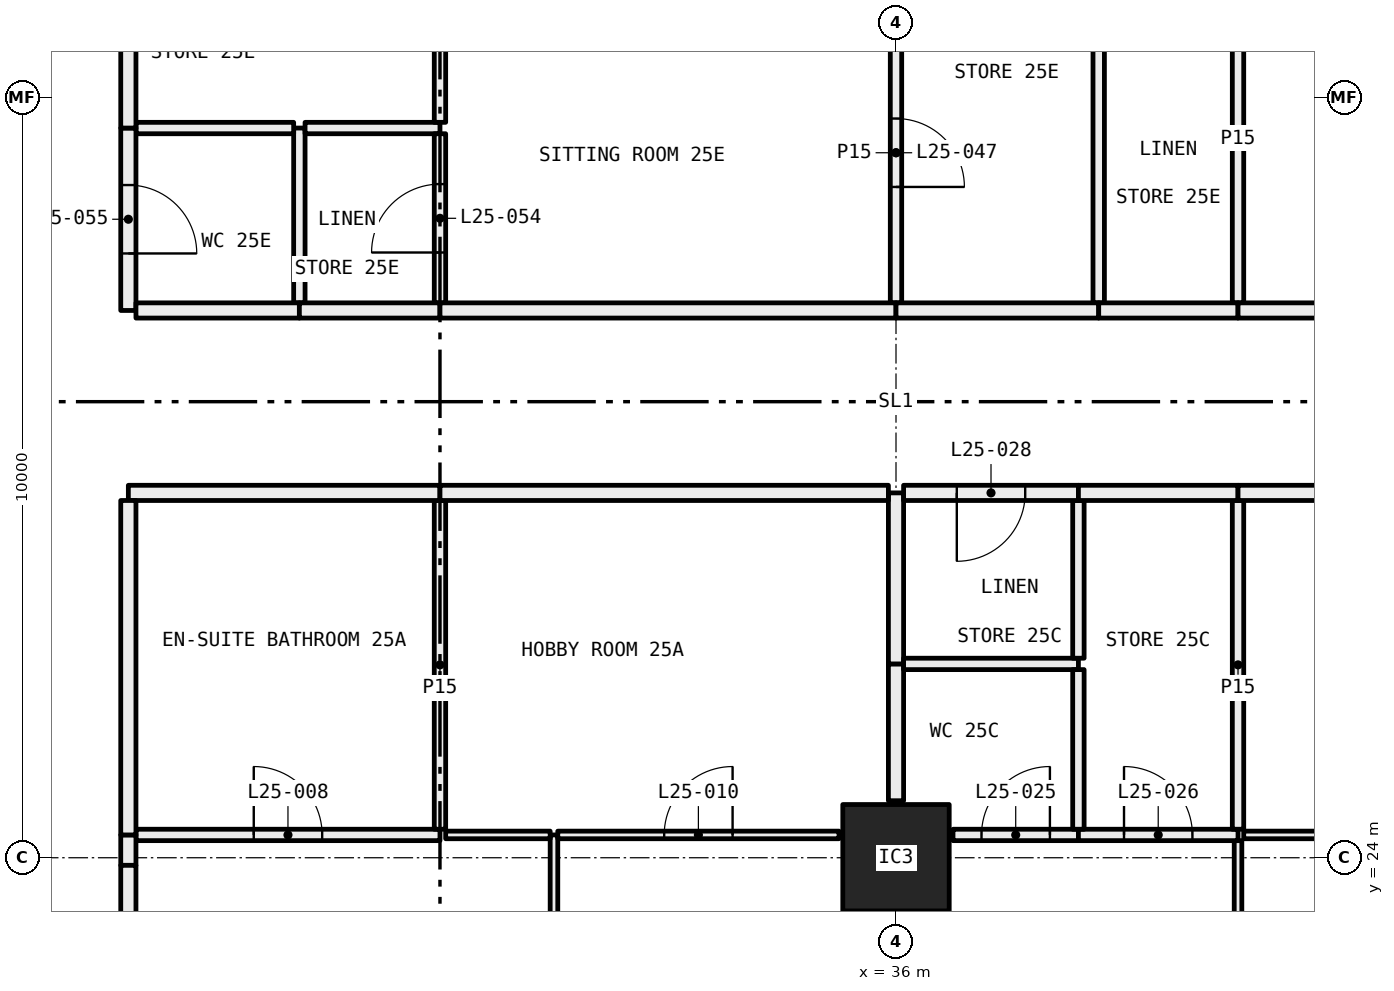
"""IFC4 building model, lengths in metres.
Left out: names, types, materials, properties, quantities, classifications, styles, units other than length and angle.
Written with IfcOpenShell. Run it as: python <this file> out.ifc"""

import sys

from ifc_helpers import new_model, si_unit, direction, frame, frame_2d, origin, origin_2d, place, context, subcontext, project, spatial, rectangle, hollow_rectangle, extrude, element, fill, save


model = new_model("IFC4")
c1 = context("Model", 3, precision=1e-05, world=origin(), true_north=direction((0.0, 1.0)))
c2 = subcontext(c1, "Body", "Model", "MODEL_VIEW")
j1 = project(units=[si_unit("LENGTHUNIT", "METRE"), si_unit("PLANEANGLEUNIT", "RADIAN")], contexts=[c1])
p1 = place(None, origin())
s1 = spatial("IfcSite", under=j1, at=p1, CompositionType="ELEMENT")
p2 = place(p1, origin())
s2 = spatial("IfcBuilding", under=s1, at=p2, CompositionType="ELEMENT")
p3 = place(p2, frame((0.0, 0.0, 100.05)))
s3 = spatial("IfcBuildingStorey", under=s2, at=p3, CompositionType="ELEMENT", Elevation=100.05)
p4 = place(p3, frame((36.0, 24.0, 0.0), z_axis=(0.0, 0.0, 1.0), x_axis=(1.0, 0.0, 0.0)))
e1 = element("IfcColumn", 1, at=p4, inside=s3, PredefinedType="COLUMN", context=c2, shape_type="SweptSolid", body=[
    extrude(hollow_rectangle(XDim=1.4, YDim=1.4, WallThickness=0.06, at=origin_2d()), origin(), (0.0, 0.0, 1.0), 3.05),
])
p5 = place(p3, frame((31.5, 18.075, 0.0), z_axis=(0.0, 0.0, 1.0), x_axis=(0.0, 1.0, 0.0)))
e2 = element("IfcWall", 2, at=p5, inside=s3, PredefinedType="PARTITIONING", context=c2, shape_type="SweptSolid", body=[
    extrude(rectangle(XDim=6.225, YDim=0.1, at=frame_2d((3.113, 0.0))), origin(), (0.0, 0.0, 1.0), 2.45),
])
p6 = place(p5, frame((2.663, 0.0, 0.0)))
e3 = element("IfcOpeningElement", 3, at=p6, cuts=e2, PredefinedType="OPENING", context=c2, shape_type="SweptSolid", body=[
    extrude(rectangle(XDim=0.9, YDim=2.1, at=frame_2d((0.45, 1.05))), frame((0.0, 0.06, 0.0), z_axis=(0.0, -1.0, 0.0), x_axis=(1.0, 0.0, 0.0)), (0.0, 0.0, 1.0), 0.12),
])
p7 = place(p3, frame((30.0, 24.3, 0.0), z_axis=(0.0, 0.0, 1.0), x_axis=(-1.0, 0.0, 0.0)))
e4 = element("IfcWall", 4, at=p7, inside=s3, PredefinedType="PARTITIONING", context=c2, shape_type="SweptSolid", body=[
    extrude(rectangle(XDim=4.0, YDim=0.15, at=frame_2d((2.0, 0.0))), origin(), (0.0, 0.0, 1.0), 3.05),
])
p8 = place(p7, frame((1.55, 0.0, 0.0)))
e5 = element("IfcOpeningElement", 5, at=p8, cuts=e4, PredefinedType="OPENING", context=c2, shape_type="SweptSolid", body=[
    extrude(rectangle(XDim=0.9, YDim=2.1, at=frame_2d((0.45, 1.05))), frame((0.0, 0.085, 0.0), z_axis=(0.0, -1.0, 0.0), x_axis=(1.0, 0.0, 0.0)), (0.0, 0.0, 1.0), 0.17),
])
p9 = place(p3, frame((31.45, 24.3, 0.0), z_axis=(0.0, 0.0, 1.0), x_axis=(-1.0, 0.0, 0.0)))
e6 = element("IfcWall", 6, at=p9, inside=s3, PredefinedType="PARTITIONING", context=c2, shape_type="SweptSolid", body=[
    extrude(rectangle(XDim=1.375, YDim=0.1, at=frame_2d((0.688, 0.0))), origin(), (0.0, 0.0, 1.0), 3.05),
])
p10 = place(p3, frame((25.9, 24.3, 0.0), z_axis=(0.0, 0.0, 1.0), x_axis=(0.0, -1.0, 0.0)))
e7 = element("IfcWall", 7, at=p10, inside=s3, PredefinedType="PARTITIONING", context=c2, shape_type="SweptSolid", body=[
    extrude(rectangle(XDim=0.4, YDim=0.2, at=frame_2d((0.2, 0.0))), origin(), (0.0, 0.0, 1.0), 2.45),
])
p11 = place(p3, frame((25.9, 23.9, 0.0), z_axis=(0.0, 0.0, 1.0), x_axis=(0.0, -1.0, 0.0)))
e8 = element("IfcWall", 8, at=p11, inside=s3, PredefinedType="PARTITIONING", context=c2, shape_type="SweptSolid", body=[
    extrude(rectangle(XDim=5.8, YDim=0.2, at=frame_2d((2.9, 0.0))), origin(), (0.0, 0.0, 1.0), 3.05),
])
p12 = place(p3, frame((35.25, 24.3, 0.0), z_axis=(0.0, 0.0, 1.0), x_axis=(-1.0, 0.0, 0.0)))
e9 = element("IfcWall", 9, at=p12, inside=s3, PredefinedType="PARTITIONING", context=c2, shape_type="SweptSolid", body=[
    extrude(rectangle(XDim=3.7, YDim=0.1, at=frame_2d((1.85, 0.0))), origin(), (0.0, 0.0, 1.0), 3.05),
])
p13 = place(p12, frame((1.4, 0.0, 0.0)))
e10 = element("IfcOpeningElement", 10, at=p13, cuts=e9, PredefinedType="OPENING", context=c2, shape_type="SweptSolid", body=[
    extrude(rectangle(XDim=0.9, YDim=2.1, at=frame_2d((0.45, 1.05))), frame((0.0, 0.06, 0.0), z_axis=(0.0, -1.0, 0.0), x_axis=(1.0, 0.0, 0.0)), (0.0, 0.0, 1.0), 0.12),
])
p14 = place(p3, frame((30.0, 24.375, 0.0), z_axis=(0.0, 0.0, 1.0), x_axis=(0.0, 1.0, 0.0)))
e11 = element("IfcWall", 11, at=p14, inside=s3, PredefinedType="PARTITIONING", context=c2, shape_type="SweptSolid", body=[
    extrude(rectangle(XDim=4.325, YDim=0.15, at=frame_2d((2.163, 0.0))), origin(), (0.0, 0.0, 1.0), 3.05),
])
p15 = place(p3, frame((30.0, 28.8, 0.0), z_axis=(0.0, 0.0, 1.0), x_axis=(-1.0, 0.0, 0.0)))
e12 = element("IfcWall", 12, at=p15, inside=s3, PredefinedType="PARTITIONING", context=c2, shape_type="SweptSolid", body=[
    extrude(rectangle(XDim=4.1, YDim=0.2, at=frame_2d((2.05, 0.0))), origin(), (0.0, 0.0, 1.0), 3.05),
])
p16 = place(p3, frame((25.9, 28.7, 0.0), z_axis=(0.0, 0.0, 1.0), x_axis=(0.0, -1.0, 0.0)))
e13 = element("IfcWall", 13, at=p16, inside=s3, PredefinedType="PARTITIONING", context=c2, shape_type="SweptSolid", body=[
    extrude(rectangle(XDim=4.4, YDim=0.2, at=frame_2d((2.2, 0.0))), origin(), (0.0, 0.0, 1.0), 3.05),
])
p17 = place(p3, frame((36.0, 24.75, 0.0), z_axis=(0.0, 0.0, 1.0), x_axis=(0.0, 1.0, 0.0)))
e14 = element("IfcWall", 14, at=p17, inside=s3, PredefinedType="PARTITIONING", context=c2, shape_type="SweptSolid", body=[
    extrude(rectangle(XDim=1.8, YDim=0.2, at=frame_2d((0.9, 0.0))), origin(), (0.0, 0.0, 1.0), 2.45),
])
p18 = place(p3, frame((36.0, 26.55, 0.0), z_axis=(0.0, 0.0, 1.0), x_axis=(0.0, 1.0, 0.0)))
e15 = element("IfcWall", 15, at=p18, inside=s3, PredefinedType="PARTITIONING", context=c2, shape_type="SweptSolid", body=[
    extrude(rectangle(XDim=2.25, YDim=0.2, at=frame_2d((1.125, 0.0))), origin(), (0.0, 0.0, 1.0), 2.45),
])
p19 = place(p3, frame((35.9, 28.8, 0.0), z_axis=(0.0, 0.0, 1.0), x_axis=(-1.0, 0.0, 0.0)))
e16 = element("IfcWall", 16, at=p19, inside=s3, PredefinedType="PARTITIONING", context=c2, shape_type="SweptSolid", body=[
    extrude(rectangle(XDim=5.9, YDim=0.2, at=frame_2d((2.95, 0.0))), origin(), (0.0, 0.0, 1.0), 3.05),
])
p20 = place(p3, frame((40.5, 18.075, 0.0), z_axis=(0.0, 0.0, 1.0), x_axis=(0.0, 1.0, 0.0)))
e17 = element("IfcWall", 17, at=p20, inside=s3, PredefinedType="PARTITIONING", context=c2, shape_type="SweptSolid", body=[
    extrude(rectangle(XDim=6.15, YDim=0.1, at=frame_2d((3.075, 0.0))), origin(), (0.0, 0.0, 1.0), 2.45),
])
p21 = place(p20, frame((2.625, 0.0, 0.0)))
e18 = element("IfcOpeningElement", 18, at=p21, cuts=e17, PredefinedType="OPENING", context=c2, shape_type="SweptSolid", body=[
    extrude(rectangle(XDim=0.9, YDim=2.1, at=frame_2d((0.45, 1.05))), frame((0.0, 0.06, 0.0), z_axis=(0.0, -1.0, 0.0), x_axis=(1.0, 0.0, 0.0)), (0.0, 0.0, 1.0), 0.12),
])
p22 = place(p3, frame((38.4, 24.3, 0.0), z_axis=(0.0, 0.0, 1.0), x_axis=(-1.0, 0.0, 0.0)))
e19 = element("IfcWall", 19, at=p22, inside=s3, PredefinedType="PARTITIONING", context=c2, shape_type="SweptSolid", body=[
    extrude(rectangle(XDim=1.65, YDim=0.15, at=frame_2d((0.825, 0.0))), origin(), (0.0, 0.0, 1.0), 3.05),
])
p23 = place(p22, frame((0.375, 0.0, 0.0)))
e20 = element("IfcOpeningElement", 20, at=p23, cuts=e19, PredefinedType="OPENING", context=c2, shape_type="SweptSolid", body=[
    extrude(rectangle(XDim=0.9, YDim=2.1, at=frame_2d((0.45, 1.05))), frame((0.0, 0.085, 0.0), z_axis=(0.0, -1.0, 0.0), x_axis=(1.0, 0.0, 0.0)), (0.0, 0.0, 1.0), 0.17),
])
p24 = place(p3, frame((40.5, 24.3, 0.0), z_axis=(0.0, 0.0, 1.0), x_axis=(-1.0, 0.0, 0.0)))
e21 = element("IfcWall", 21, at=p24, inside=s3, PredefinedType="PARTITIONING", context=c2, shape_type="SweptSolid", body=[
    extrude(rectangle(XDim=2.1, YDim=0.15, at=frame_2d((1.05, 0.0))), origin(), (0.0, 0.0, 1.0), 3.05),
])
p25 = place(p24, frame((0.6, 0.0, 0.0)))
e22 = element("IfcOpeningElement", 22, at=p25, cuts=e21, PredefinedType="OPENING", context=c2, shape_type="SweptSolid", body=[
    extrude(rectangle(XDim=0.9, YDim=2.1, at=frame_2d((0.45, 1.05))), frame((0.0, 0.085, 0.0), z_axis=(0.0, -1.0, 0.0), x_axis=(1.0, 0.0, 0.0)), (0.0, 0.0, 1.0), 0.17),
])
p26 = place(p3, frame((46.0, 24.3, 0.0), z_axis=(0.0, 0.0, 1.0), x_axis=(-1.0, 0.0, 0.0)))
e23 = element("IfcWall", 23, at=p26, inside=s3, PredefinedType="PARTITIONING", context=c2, shape_type="SweptSolid", body=[
    extrude(rectangle(XDim=5.425, YDim=0.1, at=frame_2d((2.712, 0.0))), origin(), (0.0, 0.0, 1.0), 3.05),
])
p27 = place(p26, frame((2.262, 0.0, 0.0)))
e24 = element("IfcOpeningElement", 24, at=p27, cuts=e23, PredefinedType="OPENING", context=c2, shape_type="SweptSolid", body=[
    extrude(rectangle(XDim=0.9, YDim=2.1, at=frame_2d((0.45, 1.05))), frame((0.0, 0.06, 0.0), z_axis=(0.0, -1.0, 0.0), x_axis=(1.0, 0.0, 0.0)), (0.0, 0.0, 1.0), 0.12),
])
p28 = place(p3, frame((38.4, 26.55, 0.0), z_axis=(0.0, 0.0, 1.0), x_axis=(-1.0, 0.0, 0.0)))
e25 = element("IfcWall", 25, at=p28, inside=s3, PredefinedType="PARTITIONING", context=c2, shape_type="SweptSolid", body=[
    extrude(rectangle(XDim=2.3, YDim=0.15, at=frame_2d((1.15, 0.0))), origin(), (0.0, 0.0, 1.0), 3.05),
])
p29 = place(p3, frame((38.4, 24.375, 0.0), z_axis=(0.0, 0.0, 1.0), x_axis=(0.0, 1.0, 0.0)))
e26 = element("IfcWall", 26, at=p29, inside=s3, PredefinedType="PARTITIONING", context=c2, shape_type="SweptSolid", body=[
    extrude(rectangle(XDim=2.1, YDim=0.15, at=frame_2d((1.05, 0.0))), origin(), (0.0, 0.0, 1.0), 3.05),
])
p30 = place(p3, frame((38.4, 26.625, 0.0), z_axis=(0.0, 0.0, 1.0), x_axis=(0.0, 1.0, 0.0)))
e27 = element("IfcWall", 27, at=p30, inside=s3, PredefinedType="PARTITIONING", context=c2, shape_type="SweptSolid", body=[
    extrude(rectangle(XDim=2.075, YDim=0.15, at=frame_2d((1.038, 0.0))), origin(), (0.0, 0.0, 1.0), 3.05),
])
p31 = place(p3, frame((38.4, 28.8, 0.0), z_axis=(0.0, 0.0, 1.0), x_axis=(-1.0, 0.0, 0.0)))
e28 = element("IfcWall", 28, at=p31, inside=s3, PredefinedType="PARTITIONING", context=c2, shape_type="SweptSolid", body=[
    extrude(rectangle(XDim=2.3, YDim=0.2, at=frame_2d((1.15, 0.0))), origin(), (0.0, 0.0, 1.0), 3.05),
])
p32 = place(p31, frame((0.7, 0.0, 0.0)))
e29 = element("IfcOpeningElement", 29, at=p32, cuts=e28, PredefinedType="OPENING", context=c2, shape_type="SweptSolid", body=[
    extrude(rectangle(XDim=0.9, YDim=2.1, at=frame_2d((0.45, 1.05))), frame((0.0, 0.11, 0.0), z_axis=(0.0, -1.0, 0.0), x_axis=(1.0, 0.0, 0.0)), (0.0, 0.0, 1.0), 0.22),
])
p33 = place(p3, frame((40.5, 24.375, 0.0), z_axis=(0.0, 0.0, 1.0), x_axis=(0.0, 1.0, 0.0)))
e30 = element("IfcWall", 30, at=p33, inside=s3, PredefinedType="PARTITIONING", context=c2, shape_type="SweptSolid", body=[
    extrude(rectangle(XDim=4.325, YDim=0.15, at=frame_2d((2.163, 0.0))), origin(), (0.0, 0.0, 1.0), 3.05),
])
p34 = place(p3, frame((40.5, 28.8, 0.0), z_axis=(0.0, 0.0, 1.0), x_axis=(-1.0, 0.0, 0.0)))
e31 = element("IfcWall", 31, at=p34, inside=s3, PredefinedType="PARTITIONING", context=c2, shape_type="SweptSolid", body=[
    extrude(rectangle(XDim=2.1, YDim=0.2, at=frame_2d((1.05, 0.0))), origin(), (0.0, 0.0, 1.0), 3.05),
])
p35 = place(p3, frame((46.0, 28.8, 0.0), z_axis=(0.0, 0.0, 1.0), x_axis=(-1.0, 0.0, 0.0)))
e32 = element("IfcWall", 32, at=p35, inside=s3, PredefinedType="PARTITIONING", context=c2, shape_type="SweptSolid", body=[
    extrude(rectangle(XDim=5.5, YDim=0.2, at=frame_2d((2.75, 0.0))), origin(), (0.0, 0.0, 1.0), 3.05),
])
p36 = place(p3, frame((28.15, 31.3, 0.0), z_axis=(0.0, 0.0, 1.0), x_axis=(0.0, 1.0, 0.0)))
e33 = element("IfcWall", 33, at=p36, inside=s3, PredefinedType="PARTITIONING", context=c2, shape_type="SweptSolid", body=[
    extrude(rectangle(XDim=2.3, YDim=0.15, at=frame_2d((1.15, 0.0))), origin(), (0.0, 0.0, 1.0), 3.05),
])
p37 = place(p3, frame((28.075, 33.6, 0.0), z_axis=(0.0, 0.0, 1.0), x_axis=(-1.0, 0.0, 0.0)))
e34 = element("IfcWall", 34, at=p37, inside=s3, PredefinedType="PARTITIONING", context=c2, shape_type="SweptSolid", body=[
    extrude(rectangle(XDim=2.075, YDim=0.15, at=frame_2d((1.038, 0.0))), origin(), (0.0, 0.0, 1.0), 3.05),
])
p38 = place(p3, frame((25.9, 33.6, 0.0), z_axis=(0.0, 0.0, 1.0), x_axis=(0.0, -1.0, 0.0)))
e35 = element("IfcWall", 35, at=p38, inside=s3, PredefinedType="PARTITIONING", context=c2, shape_type="SweptSolid", body=[
    extrude(rectangle(XDim=2.4, YDim=0.2, at=frame_2d((1.2, 0.0))), origin(), (0.0, 0.0, 1.0), 3.05),
])
p39 = place(p38, frame((0.75, 0.0, 0.0)))
e36 = element("IfcOpeningElement", 36, at=p39, cuts=e35, PredefinedType="OPENING", context=c2, shape_type="SweptSolid", body=[
    extrude(rectangle(XDim=0.9, YDim=2.1, at=frame_2d((0.45, 1.05))), frame((0.0, 0.11, 0.0), z_axis=(0.0, -1.0, 0.0), x_axis=(1.0, 0.0, 0.0)), (0.0, 0.0, 1.0), 0.22),
])
p40 = place(p3, frame((26.0, 31.2, 0.0), z_axis=(0.0, 0.0, 1.0), x_axis=(1.0, 0.0, 0.0)))
e37 = element("IfcWall", 37, at=p40, inside=s3, PredefinedType="PARTITIONING", context=c2, shape_type="SweptSolid", body=[
    extrude(rectangle(XDim=2.15, YDim=0.2, at=frame_2d((1.075, 0.0))), origin(), (0.0, 0.0, 1.0), 3.05),
])
p41 = place(p3, frame((30.0, 33.6, 0.0), z_axis=(0.0, 0.0, 1.0), x_axis=(-1.0, 0.0, 0.0)))
e38 = element("IfcWall", 38, at=p41, inside=s3, PredefinedType="PARTITIONING", context=c2, shape_type="SweptSolid", body=[
    extrude(rectangle(XDim=1.775, YDim=0.15, at=frame_2d((0.887, 0.0))), origin(), (0.0, 0.0, 1.0), 3.05),
])
p42 = place(p3, frame((30.0, 31.3, 0.0), z_axis=(0.0, 0.0, 1.0), x_axis=(0.0, 1.0, 0.0)))
e39 = element("IfcWall", 39, at=p42, inside=s3, PredefinedType="PARTITIONING", context=c2, shape_type="SweptSolid", body=[
    extrude(rectangle(XDim=2.225, YDim=0.15, at=frame_2d((1.112, 0.0))), origin(), (0.0, 0.0, 1.0), 3.05),
])
p43 = place(p42, frame((0.663, 0.0, 0.0)))
e40 = element("IfcOpeningElement", 40, at=p43, cuts=e39, PredefinedType="OPENING", context=c2, shape_type="SweptSolid", body=[
    extrude(rectangle(XDim=0.9, YDim=2.1, at=frame_2d((0.45, 1.05))), frame((0.0, 0.085, 0.0), z_axis=(0.0, -1.0, 0.0), x_axis=(1.0, 0.0, 0.0)), (0.0, 0.0, 1.0), 0.17),
])
p44 = place(p3, frame((28.15, 31.2, 0.0), z_axis=(0.0, 0.0, 1.0), x_axis=(1.0, 0.0, 0.0)))
e41 = element("IfcWall", 41, at=p44, inside=s3, PredefinedType="PARTITIONING", context=c2, shape_type="SweptSolid", body=[
    extrude(rectangle(XDim=1.85, YDim=0.2, at=frame_2d((0.925, 0.0))), origin(), (0.0, 0.0, 1.0), 3.05),
])
p45 = place(p3, frame((30.0, 33.675, 0.0), z_axis=(0.0, 0.0, 1.0), x_axis=(0.0, 1.0, 0.0)))
e42 = element("IfcWall", 42, at=p45, inside=s3, PredefinedType="PARTITIONING", context=c2, shape_type="SweptSolid", body=[
    extrude(rectangle(XDim=1.95, YDim=0.15, at=frame_2d((0.975, 0.0))), origin(), (0.0, 0.0, 1.0), 3.05),
])
p46 = place(p3, frame((25.9, 35.7, 0.0), z_axis=(0.0, 0.0, 1.0), x_axis=(0.0, -1.0, 0.0)))
e43 = element("IfcWall", 43, at=p46, inside=s3, PredefinedType="PARTITIONING", context=c2, shape_type="SweptSolid", body=[
    extrude(rectangle(XDim=2.1, YDim=0.2, at=frame_2d((1.05, 0.0))), origin(), (0.0, 0.0, 1.0), 3.05),
])
p47 = place(p3, frame((36.0, 31.3, 0.0), z_axis=(0.0, 0.0, 1.0), x_axis=(0.0, 1.0, 0.0)))
e44 = element("IfcWall", 44, at=p47, inside=s3, PredefinedType="PARTITIONING", context=c2, shape_type="SweptSolid", body=[
    extrude(rectangle(XDim=3.95, YDim=0.15, at=frame_2d((1.975, 0.0))), origin(), (0.0, 0.0, 1.0), 2.45),
])
p48 = place(p47, frame((1.525, 0.0, 0.0)))
e45 = element("IfcOpeningElement", 45, at=p48, cuts=e44, PredefinedType="OPENING", context=c2, shape_type="SweptSolid", body=[
    extrude(rectangle(XDim=0.9, YDim=2.1, at=frame_2d((0.45, 1.05))), frame((0.0, 0.085, 0.0), z_axis=(0.0, -1.0, 0.0), x_axis=(1.0, 0.0, 0.0)), (0.0, 0.0, 1.0), 0.17),
])
p49 = place(p3, frame((30.0, 31.2, 0.0), z_axis=(0.0, 0.0, 1.0), x_axis=(1.0, 0.0, 0.0)))
e46 = element("IfcWall", 46, at=p49, inside=s3, PredefinedType="PARTITIONING", context=c2, shape_type="SweptSolid", body=[
    extrude(rectangle(XDim=6.0, YDim=0.2, at=frame_2d((3.0, 0.0))), origin(), (0.0, 0.0, 1.0), 2.45),
])
p50 = place(p3, frame((38.667, 31.3, 0.0), z_axis=(0.0, 0.0, 1.0), x_axis=(0.0, 1.0, 0.0)))
e47 = element("IfcWall", 47, at=p50, inside=s3, PredefinedType="PARTITIONING", context=c2, shape_type="SweptSolid", body=[
    extrude(rectangle(XDim=4.325, YDim=0.15, at=frame_2d((2.163, 0.0))), origin(), (0.0, 0.0, 1.0), 3.05),
])
p51 = place(p3, frame((36.0, 31.2, 0.0), z_axis=(0.0, 0.0, 1.0), x_axis=(1.0, 0.0, 0.0)))
e48 = element("IfcWall", 48, at=p51, inside=s3, PredefinedType="PARTITIONING", context=c2, shape_type="SweptSolid", body=[
    extrude(rectangle(XDim=2.667, YDim=0.2, at=frame_2d((1.333, 0.0))), origin(), (0.0, 0.0, 1.0), 2.45),
])
p52 = place(p3, frame((40.5, 31.3, 0.0), z_axis=(0.0, 0.0, 1.0), x_axis=(0.0, 1.0, 0.0)))
e49 = element("IfcWall", 49, at=p52, inside=s3, PredefinedType="PARTITIONING", context=c2, shape_type="SweptSolid", body=[
    extrude(rectangle(XDim=4.325, YDim=0.15, at=frame_2d((2.163, 0.0))), origin(), (0.0, 0.0, 1.0), 3.05),
])
p53 = place(p3, frame((38.667, 31.2, 0.0), z_axis=(0.0, 0.0, 1.0), x_axis=(1.0, 0.0, 0.0)))
e50 = element("IfcWall", 50, at=p53, inside=s3, PredefinedType="PARTITIONING", context=c2, shape_type="SweptSolid", body=[
    extrude(rectangle(XDim=1.833, YDim=0.2, at=frame_2d((0.917, 0.0))), origin(), (0.0, 0.0, 1.0), 3.05),
])
p54 = place(p3, frame((40.5, 31.2, 0.0), z_axis=(0.0, 0.0, 1.0), x_axis=(1.0, 0.0, 0.0)))
e51 = element("IfcWall", 51, at=p54, inside=s3, PredefinedType="PARTITIONING", context=c2, shape_type="SweptSolid", body=[
    extrude(rectangle(XDim=5.6, YDim=0.2, at=frame_2d((2.8, 0.0))), origin(), (0.0, 0.0, 1.0), 3.05),
])
p55 = place(p8, frame((0.9, 0.0, 0.0), x_axis=(-1.0, 0.0, 0.0)))
e52 = element("IfcDoor", 52, at=p55, inside=s3, OperationType="SINGLE_SWING_RIGHT", PredefinedType="DOOR", context=c2, shape_type="SweptSolid", body=[
    extrude(rectangle(XDim=0.9, YDim=2.1, at=frame_2d((0.45, 1.05))), frame((0.0, 0.025, 0.0), z_axis=(0.0, -1.0, 0.0), x_axis=(1.0, 0.0, 0.0)), (0.0, 0.0, 1.0), 0.05),
])
fill(e5, e52)
p56 = place(p13, frame((0.9, 0.0, 0.0), x_axis=(-1.0, 0.0, 0.0)))
e53 = element("IfcDoor", 53, at=p56, inside=s3, OperationType="SINGLE_SWING_LEFT", PredefinedType="DOOR", context=c2, shape_type="SweptSolid", body=[
    extrude(rectangle(XDim=0.9, YDim=2.1, at=frame_2d((0.45, 1.05))), frame((0.0, 0.025, 0.0), z_axis=(0.0, -1.0, 0.0), x_axis=(1.0, 0.0, 0.0)), (0.0, 0.0, 1.0), 0.05),
])
fill(e10, e53)
p57 = place(p23, frame((0.9, 0.0, 0.0), x_axis=(-1.0, 0.0, 0.0)))
e54 = element("IfcDoor", 54, at=p57, inside=s3, OperationType="SINGLE_SWING_LEFT", PredefinedType="DOOR", context=c2, shape_type="SweptSolid", body=[
    extrude(rectangle(XDim=0.9, YDim=2.1, at=frame_2d((0.45, 1.05))), frame((0.0, 0.025, 0.0), z_axis=(0.0, -1.0, 0.0), x_axis=(1.0, 0.0, 0.0)), (0.0, 0.0, 1.0), 0.05),
])
fill(e20, e54)
p58 = place(p25, frame((0.9, 0.0, 0.0), x_axis=(-1.0, 0.0, 0.0)))
e55 = element("IfcDoor", 55, at=p58, inside=s3, OperationType="SINGLE_SWING_RIGHT", PredefinedType="DOOR", context=c2, shape_type="SweptSolid", body=[
    extrude(rectangle(XDim=0.9, YDim=2.1, at=frame_2d((0.45, 1.05))), frame((0.0, 0.025, 0.0), z_axis=(0.0, -1.0, 0.0), x_axis=(1.0, 0.0, 0.0)), (0.0, 0.0, 1.0), 0.05),
])
fill(e22, e55)
p59 = place(p32, origin())
e56 = element("IfcDoor", 56, at=p59, inside=s3, OperationType="SINGLE_SWING_LEFT", PredefinedType="DOOR", context=c2, shape_type="SweptSolid", body=[
    extrude(rectangle(XDim=0.9, YDim=2.1, at=frame_2d((0.45, 1.05))), frame((0.0, 0.025, 0.0), z_axis=(0.0, -1.0, 0.0), x_axis=(1.0, 0.0, 0.0)), (0.0, 0.0, 1.0), 0.05),
])
fill(e29, e56)
p60 = place(p48, frame((0.9, 0.0, 0.0), x_axis=(-1.0, 0.0, 0.0)))
e57 = element("IfcDoor", 57, at=p60, inside=s3, OperationType="SINGLE_SWING_LEFT", PredefinedType="DOOR", context=c2, shape_type="SweptSolid", body=[
    extrude(rectangle(XDim=0.9, YDim=2.1, at=frame_2d((0.45, 1.05))), frame((0.0, 0.025, 0.0), z_axis=(0.0, -1.0, 0.0), x_axis=(1.0, 0.0, 0.0)), (0.0, 0.0, 1.0), 0.05),
])
fill(e45, e57)
p61 = place(p43, origin())
e58 = element("IfcDoor", 58, at=p61, inside=s3, OperationType="SINGLE_SWING_RIGHT", PredefinedType="DOOR", context=c2, shape_type="SweptSolid", body=[
    extrude(rectangle(XDim=0.9, YDim=2.1, at=frame_2d((0.45, 1.05))), frame((0.0, 0.025, 0.0), z_axis=(0.0, -1.0, 0.0), x_axis=(1.0, 0.0, 0.0)), (0.0, 0.0, 1.0), 0.05),
])
fill(e40, e58)
p62 = place(p39, origin())
e59 = element("IfcDoor", 59, at=p62, inside=s3, OperationType="SINGLE_SWING_LEFT", PredefinedType="DOOR", context=c2, shape_type="SweptSolid", body=[
    extrude(rectangle(XDim=0.9, YDim=2.1, at=frame_2d((0.45, 1.05))), frame((0.0, 0.025, 0.0), z_axis=(0.0, -1.0, 0.0), x_axis=(1.0, 0.0, 0.0)), (0.0, 0.0, 1.0), 0.05),
])
fill(e36, e59)
save(model, sys.argv[1])
